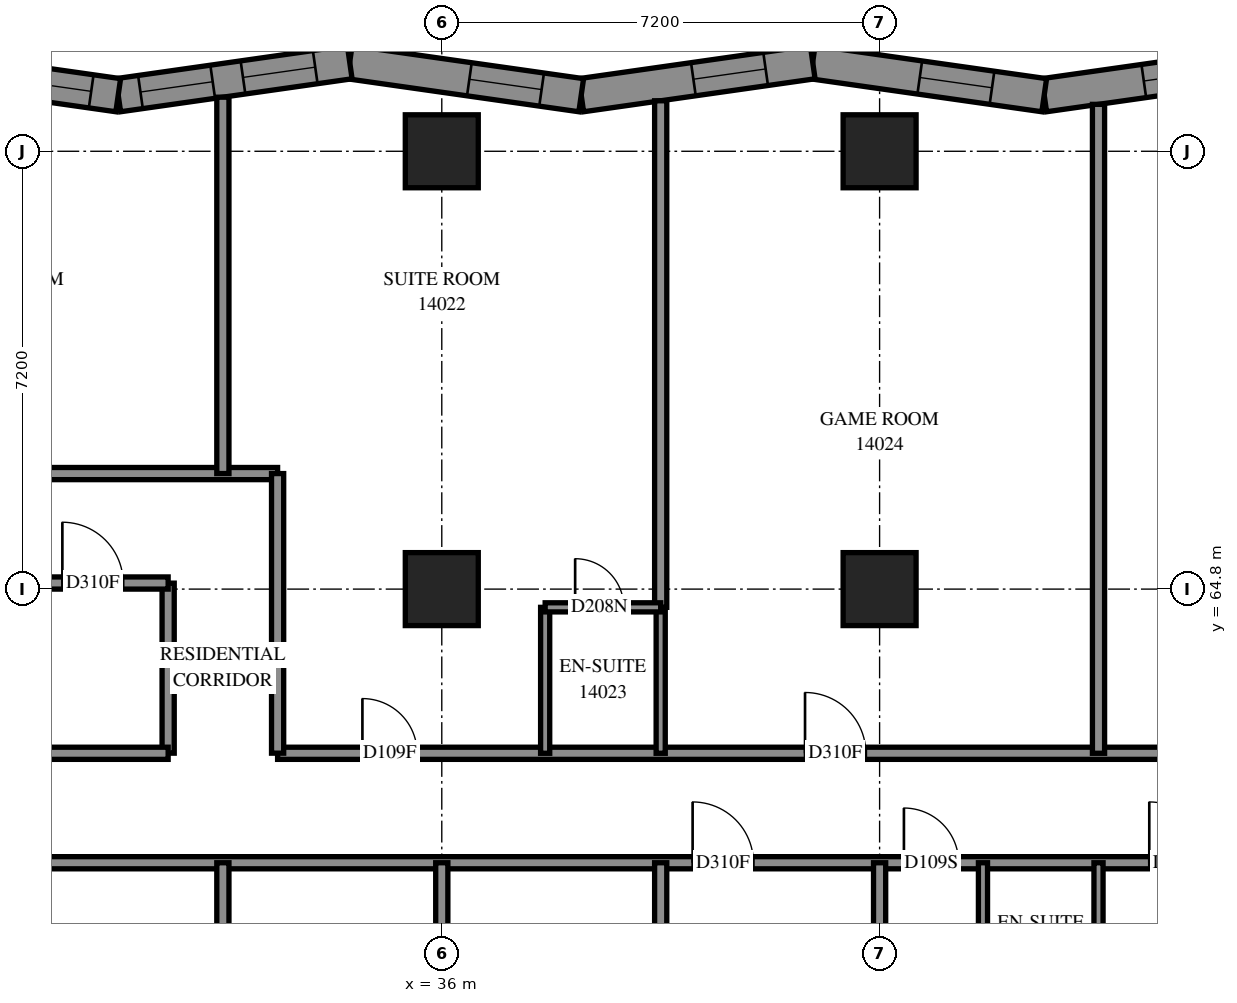
"""IFC4 building model, lengths in metres.
Left out: names, types, materials, properties, quantities, classifications, styles, units other than length and angle.
Written with IfcOpenShell. Run it as: python <this file> out.ifc"""

import sys

from ifc_helpers import new_model, si_unit, direction, frame, frame_2d, origin, origin_2d, place, context, subcontext, project, spatial, polyline, rectangle, outline, extrude, element, fill, save


model = new_model("IFC4")
c1 = context("Model", 3, precision=1e-05, world=origin(), true_north=direction((0.0, 1.0)))
c2 = subcontext(c1, "Body", "Model", "MODEL_VIEW")
j1 = project(units=[si_unit("LENGTHUNIT", "METRE"), si_unit("PLANEANGLEUNIT", "RADIAN")], contexts=[c1])
p1 = place(None, origin())
s1 = spatial("IfcSite", under=j1, at=p1, CompositionType="ELEMENT")
p2 = place(p1, origin())
s2 = spatial("IfcBuilding", under=s1, at=p2, CompositionType="ELEMENT")
p3 = place(p2, frame((0.0, 0.0, 54.2)))
s3 = spatial("IfcBuildingStorey", under=s2, at=p3, CompositionType="ELEMENT", Elevation=54.2)
for number, where, z_axis, x_axis in (
    (1, (36.0, 64.8, 0.0), (0.0, 0.0, 1.0), (1.0, 0.0, 0.0)),
    (2, (36.0, 72.0, 0.0), (0.0, 0.0, 1.0), (1.0, 0.0, 0.0)),
    (3, (43.2, 64.8, 0.0), (0.0, 0.0, 1.0), (1.0, 0.0, 0.0)),
    (4, (43.2, 72.0, 0.0), (0.0, 0.0, 1.0), (1.0, 0.0, 0.0)),
):
    element("IfcColumn", number, at=place(p3, frame(where, z_axis=z_axis, x_axis=x_axis)), inside=s3, PredefinedType="COLUMN", context=c2, shape_type="SweptSolid", body=[
        extrude(rectangle(XDim=1.2, YDim=1.2, at=origin_2d()), origin(), (0.0, 0.0, 1.0), 3.1),
    ])
p4 = place(p3, frame((49.714, 73.464, 0.0), z_axis=(0.0, 0.0, 1.0), x_axis=(-0.990016994, -0.1409480459, 0.0)))
e5 = element("IfcWall", 5, at=p4, inside=s3, PredefinedType="SOLIDWALL", context=c2, shape_type="SweptSolid", body=[
    extrude(outline(polyline([(-0.039, -0.275), (3.806, -0.275), (3.885, 0.275), (0.039, 0.275), (-0.039, -0.275)])), origin(), (0.0, 0.0, 1.0), 3.1),
])
p5 = place(p4, frame((0.991, 0.0, 0.5)))
e6 = element("IfcOpeningElement", 6, at=p5, cuts=e5, PredefinedType="OPENING", context=c2, shape_type="SweptSolid", body=[
    extrude(rectangle(XDim=1.2, YDim=2.45, at=frame_2d((0.6, 1.225))), frame((0.0, 0.285, 0.0), z_axis=(0.0, -1.0, 0.0), x_axis=(1.0, 0.0, 0.0)), (0.0, 0.0, 1.0), 0.57),
])
p6 = place(p3, frame((45.907, 72.922, 0.0), z_axis=(0.0, 0.0, 1.0), x_axis=(-0.9900175106, 0.1409444172, 0.0)))
e7 = element("IfcWall", 7, at=p6, inside=s3, PredefinedType="SOLIDWALL", context=c2, shape_type="SweptSolid", body=[
    extrude(outline(polyline([(0.039, -0.275), (3.885, -0.275), (3.806, 0.275), (-0.039, 0.275), (0.039, -0.275)])), origin(), (0.0, 0.0, 1.0), 3.1),
])
p7 = place(p6, frame((0.867, 0.0, 0.5)))
e8 = element("IfcOpeningElement", 8, at=p7, cuts=e7, PredefinedType="OPENING", context=c2, shape_type="SweptSolid", body=[
    extrude(rectangle(XDim=1.2, YDim=2.45, at=frame_2d((0.6, 1.225))), frame((0.0, 0.285, 0.0), z_axis=(0.0, -1.0, 0.0), x_axis=(1.0, 0.0, 0.0)), (0.0, 0.0, 1.0), 0.57),
])
p8 = place(p3, frame((42.1, 73.464, 0.0), z_axis=(0.0, 0.0, 1.0), x_axis=(-0.990016994, -0.1409480459, 0.0)))
e9 = element("IfcWall", 9, at=p8, inside=s3, PredefinedType="SOLIDWALL", context=c2, shape_type="SweptSolid", body=[
    extrude(outline(polyline([(-0.039, -0.275), (3.806, -0.275), (3.885, 0.275), (0.039, 0.275), (-0.039, -0.275)])), origin(), (0.0, 0.0, 1.0), 3.1),
])
p9 = place(p8, frame((0.782, 0.0, 0.5)))
e10 = element("IfcOpeningElement", 10, at=p9, cuts=e9, PredefinedType="OPENING", context=c2, shape_type="SweptSolid", body=[
    extrude(rectangle(XDim=1.2, YDim=2.45, at=frame_2d((0.6, 1.225))), frame((0.0, 0.285, 0.0), z_axis=(0.0, -1.0, 0.0), x_axis=(1.0, 0.0, 0.0)), (0.0, 0.0, 1.0), 0.57),
])
p10 = place(p3, frame((38.293, 72.922, 0.0), z_axis=(0.0, 0.0, 1.0), x_axis=(-0.990016994, 0.1409480459, 0.0)))
e11 = element("IfcWall", 11, at=p10, inside=s3, PredefinedType="SOLIDWALL", context=c2, shape_type="SweptSolid", body=[
    extrude(outline(polyline([(0.039, -0.275), (3.885, -0.275), (3.806, 0.275), (-0.039, 0.275), (0.039, -0.275)])), origin(), (0.0, 0.0, 1.0), 3.1),
])
p11 = place(p10, frame((0.658, 0.0, 0.5)))
e12 = element("IfcOpeningElement", 12, at=p11, cuts=e11, PredefinedType="OPENING", context=c2, shape_type="SweptSolid", body=[
    extrude(rectangle(XDim=1.2, YDim=2.45, at=frame_2d((0.6, 1.225))), frame((0.0, 0.285, 0.0), z_axis=(0.0, -1.0, 0.0), x_axis=(1.0, 0.0, 0.0)), (0.0, 0.0, 1.0), 0.57),
])
p12 = place(p3, frame((34.486, 73.464, 0.0), z_axis=(0.0, 0.0, 1.0), x_axis=(-0.990016994, -0.1409480459, 0.0)))
e13 = element("IfcWall", 13, at=p12, inside=s3, PredefinedType="SOLIDWALL", context=c2, shape_type="SweptSolid", body=[
    extrude(outline(polyline([(-0.039, -0.275), (3.806, -0.275), (3.885, 0.275), (0.039, 0.275), (-0.039, -0.275)])), origin(), (0.0, 0.0, 1.0), 3.1),
])
p13 = place(p12, frame((0.573, 0.0, 0.5)))
e14 = element("IfcOpeningElement", 14, at=p13, cuts=e13, PredefinedType="OPENING", context=c2, shape_type="SweptSolid", body=[
    extrude(rectangle(XDim=1.2, YDim=2.45, at=frame_2d((0.6, 1.225))), frame((0.0, 0.285, 0.0), z_axis=(0.0, -1.0, 0.0), x_axis=(1.0, 0.0, 0.0)), (0.0, 0.0, 1.0), 0.57),
])
p14 = place(p12, frame((2.276, 0.0, 0.5)))
e15 = element("IfcOpeningElement", 15, at=p14, cuts=e13, PredefinedType="OPENING", context=c2, shape_type="SweptSolid", body=[
    extrude(rectangle(XDim=1.2, YDim=2.45, at=frame_2d((0.6, 1.225))), frame((0.0, 0.285, 0.0), z_axis=(0.0, -1.0, 0.0), x_axis=(1.0, 0.0, 0.0)), (0.0, 0.0, 1.0), 0.57),
])
p15 = place(p3, frame((30.679, 72.922, 0.0), z_axis=(0.0, 0.0, 1.0), x_axis=(-0.990016994, 0.1409480459, 0.0)))
e16 = element("IfcWall", 16, at=p15, inside=s3, PredefinedType="SOLIDWALL", context=c2, shape_type="SweptSolid", body=[
    extrude(outline(polyline([(0.039, -0.275), (3.885, -0.275), (3.806, 0.275), (-0.039, 0.275), (0.039, -0.275)])), origin(), (0.0, 0.0, 1.0), 3.1),
])
p16 = place(p15, frame((0.449, 0.0, 0.5)))
e17 = element("IfcOpeningElement", 17, at=p16, cuts=e16, PredefinedType="OPENING", context=c2, shape_type="SweptSolid", body=[
    extrude(rectangle(XDim=1.2, YDim=2.45, at=frame_2d((0.6, 1.225))), frame((0.0, 0.285, 0.0), z_axis=(0.0, -1.0, 0.0), x_axis=(1.0, 0.0, 0.0)), (0.0, 0.0, 1.0), 0.57),
])
p17 = place(p15, frame((2.152, 0.0, 0.5)))
e18 = element("IfcOpeningElement", 18, at=p17, cuts=e16, PredefinedType="OPENING", context=c2, shape_type="SweptSolid", body=[
    extrude(rectangle(XDim=1.2, YDim=2.45, at=frame_2d((0.6, 1.225))), frame((0.0, 0.285, 0.0), z_axis=(0.0, -1.0, 0.0), x_axis=(1.0, 0.0, 0.0)), (0.0, 0.0, 1.0), 0.57),
])
p18 = place(p3, frame((28.802, 60.3, 0.0), z_axis=(0.0, 0.0, 1.0), x_axis=(1.0, 0.0, 0.0)))
e19 = element("IfcWall", 19, at=p18, inside=s3, PredefinedType="PARTITIONING", context=c2, shape_type="SweptSolid", body=[
    extrude(rectangle(XDim=24.108, YDim=0.2, at=frame_2d((12.054, 0.0))), origin(), (0.0, 0.0, 1.0), 3.1),
])
p19 = place(p18, frame((11.323, 0.0, 0.0)))
e20 = element("IfcOpeningElement", 20, at=p19, cuts=e19, PredefinedType="OPENING", context=c2, shape_type="SweptSolid", body=[
    extrude(rectangle(XDim=1.0, YDim=2.1, at=frame_2d((0.5, 1.05))), frame((0.0, 0.11, 0.0), z_axis=(0.0, -1.0, 0.0), x_axis=(1.0, 0.0, 0.0)), (0.0, 0.0, 1.0), 0.22),
])
p20 = place(p18, frame((14.798, 0.0, 0.0)))
e21 = element("IfcOpeningElement", 21, at=p20, cuts=e19, PredefinedType="OPENING", context=c2, shape_type="SweptSolid", body=[
    extrude(rectangle(XDim=0.9, YDim=2.1, at=frame_2d((0.45, 1.05))), frame((0.0, 0.11, 0.0), z_axis=(0.0, -1.0, 0.0), x_axis=(1.0, 0.0, 0.0)), (0.0, 0.0, 1.0), 0.22),
])
p21 = place(p18, frame((18.833, 0.0, 0.0)))
e22 = element("IfcOpeningElement", 22, at=p21, cuts=e19, PredefinedType="OPENING", context=c2, shape_type="SweptSolid", body=[
    extrude(rectangle(XDim=1.0, YDim=2.1, at=frame_2d((0.5, 1.05))), frame((0.0, 0.11, 0.0), z_axis=(0.0, -1.0, 0.0), x_axis=(1.0, 0.0, 0.0)), (0.0, 0.0, 1.0), 0.22),
])
p22 = place(p18, frame((22.839, 0.0, 0.0)))
e23 = element("IfcOpeningElement", 23, at=p22, cuts=e19, PredefinedType="OPENING", context=c2, shape_type="SweptSolid", body=[
    extrude(rectangle(XDim=1.0, YDim=2.1, at=frame_2d((0.5, 1.05))), frame((0.0, 0.11, 0.0), z_axis=(0.0, -1.0, 0.0), x_axis=(1.0, 0.0, 0.0)), (0.0, 0.0, 1.0), 0.22),
])
p23 = place(p3, frame((33.3, 62.1, 0.0), z_axis=(0.0, 0.0, 1.0), x_axis=(1.0, 0.0, 0.0)))
e24 = element("IfcWall", 24, at=p23, inside=s3, PredefinedType="PARTITIONING", context=c2, shape_type="SweptSolid", body=[
    extrude(rectangle(XDim=21.2, YDim=0.2, at=frame_2d((10.6, 0.0))), origin(), (0.0, 0.0, 1.0), 3.1),
])
p24 = place(p23, frame((1.395, 0.0, 0.0)))
e25 = element("IfcOpeningElement", 25, at=p24, cuts=e24, PredefinedType="OPENING", context=c2, shape_type="SweptSolid", body=[
    extrude(rectangle(XDim=0.9, YDim=2.1, at=frame_2d((0.45, 1.05))), frame((0.0, 0.11, 0.0), z_axis=(0.0, -1.0, 0.0), x_axis=(1.0, 0.0, 0.0)), (0.0, 0.0, 1.0), 0.22),
])
p25 = place(p23, frame((8.674, 0.0, 0.0)))
e26 = element("IfcOpeningElement", 26, at=p25, cuts=e24, PredefinedType="OPENING", context=c2, shape_type="SweptSolid", body=[
    extrude(rectangle(XDim=1.0, YDim=2.1, at=frame_2d((0.5, 1.05))), frame((0.0, 0.11, 0.0), z_axis=(0.0, -1.0, 0.0), x_axis=(1.0, 0.0, 0.0)), (0.0, 0.0, 1.0), 0.22),
])
p26 = place(p23, frame((15.874, 0.0, 0.0)))
e27 = element("IfcOpeningElement", 27, at=p26, cuts=e24, PredefinedType="OPENING", context=c2, shape_type="SweptSolid", body=[
    extrude(rectangle(XDim=1.0, YDim=2.1, at=frame_2d((0.5, 1.05))), frame((0.0, 0.11, 0.0), z_axis=(0.0, -1.0, 0.0), x_axis=(1.0, 0.0, 0.0)), (0.0, 0.0, 1.0), 0.22),
])
p27 = place(p3, frame((21.602, 66.7, 0.0), z_axis=(0.0, 0.0, 1.0), x_axis=(1.0, 0.0, 0.0)))
e28 = element("IfcWall", 28, at=p27, inside=s3, PredefinedType="PARTITIONING", context=c2, shape_type="SweptSolid", body=[
    extrude(rectangle(XDim=11.698, YDim=0.2, at=frame_2d((5.849, 0.0))), origin(), (0.0, 0.0, 1.0), 3.1),
])
p28 = place(p27, frame((1.79, 0.0, 0.0)))
e29 = element("IfcOpeningElement", 29, at=p28, cuts=e28, PredefinedType="OPENING", context=c2, shape_type="SweptSolid", body=[
    extrude(rectangle(XDim=1.0, YDim=2.1, at=frame_2d((0.5, 1.05))), frame((0.0, 0.11, 0.0), z_axis=(0.0, -1.0, 0.0), x_axis=(1.0, 0.0, 0.0)), (0.0, 0.0, 1.0), 0.22),
])
p29 = place(p27, frame((5.972, 0.0, 0.0)))
e30 = element("IfcOpeningElement", 30, at=p29, cuts=e28, PredefinedType="OPENING", context=c2, shape_type="SweptSolid", body=[
    extrude(rectangle(XDim=1.0, YDim=2.1, at=frame_2d((0.5, 1.05))), frame((0.0, 0.11, 0.0), z_axis=(0.0, -1.0, 0.0), x_axis=(1.0, 0.0, 0.0)), (0.0, 0.0, 1.0), 0.22),
])
p30 = place(p3, frame((46.8, 62.1, 0.0), z_axis=(0.0, 0.0, 1.0), x_axis=(0.0, 1.0, 0.0)))
e31 = element("IfcWall", 31, at=p30, inside=s3, PredefinedType="PARTITIONING", context=c2, shape_type="SweptSolid", body=[
    extrude(rectangle(XDim=10.672, YDim=0.2, at=frame_2d((5.336, 0.0))), origin(), (0.0, 0.0, 1.0), 3.1),
])
p31 = place(p3, frame((39.6, 64.5, 0.0), z_axis=(0.0, 0.0, 1.0), x_axis=(0.0, 1.0, 0.0)))
e32 = element("IfcWall", 32, at=p31, inside=s3, PredefinedType="PARTITIONING", context=c2, shape_type="SweptSolid", body=[
    extrude(rectangle(XDim=8.331, YDim=0.2, at=frame_2d((4.165, 0.0))), origin(), (0.0, 0.0, 1.0), 3.1),
])
p32 = place(p3, frame((32.4, 66.7, 0.0), z_axis=(0.0, 0.0, 1.0), x_axis=(0.0, 1.0, 0.0)))
e33 = element("IfcWall", 33, at=p32, inside=s3, PredefinedType="PARTITIONING", context=c2, shape_type="SweptSolid", body=[
    extrude(rectangle(XDim=6.189, YDim=0.2, at=frame_2d((3.095, 0.0))), origin(), (0.0, 0.0, 1.0), 3.1),
])
p33 = place(p3, frame((33.3, 62.102, 0.0), z_axis=(0.0, 0.0, 1.0), x_axis=(0.0, 1.0, 0.0)))
e34 = element("IfcWall", 34, at=p33, inside=s3, PredefinedType="PARTITIONING", context=c2, shape_type="SweptSolid", body=[
    extrude(rectangle(XDim=4.598, YDim=0.2, at=frame_2d((2.299, 0.0))), origin(), (0.0, 0.0, 1.0), 3.1),
])
for number, where, z_axis, x_axis in (
    (35, (32.4, 55.808, 0.0), (0.0, 0.0, 1.0), (0.0, 1.0, 0.0)),
    (36, (39.6, 55.808, 0.0), (0.0, 0.0, 1.0), (0.0, 1.0, 0.0)),
):
    element("IfcWall", number, at=place(p3, frame(where, z_axis=z_axis, x_axis=x_axis)), inside=s3, PredefinedType="PARTITIONING", context=c2, shape_type="SweptSolid", body=[
        extrude(rectangle(XDim=4.492, YDim=0.2, at=frame_2d((2.246, 0.0))), origin(), (0.0, 0.0, 1.0), 3.1),
    ])
p34 = place(p3, frame((31.5, 62.102, 0.0), z_axis=(0.0, 0.0, 1.0), x_axis=(0.0, 1.0, 0.0)))
e37 = element("IfcWall", 37, at=p34, inside=s3, PredefinedType="PARTITIONING", context=c2, shape_type="SweptSolid", body=[
    extrude(rectangle(XDim=2.796, YDim=0.2, at=frame_2d((1.398, 0.0))), origin(), (0.0, 0.0, 1.0), 3.1),
])
p35 = place(p3, frame((28.802, 62.1, 0.0), z_axis=(0.0, 0.0, 1.0), x_axis=(1.0, 0.0, 0.0)))
e38 = element("IfcWall", 38, at=p35, inside=s3, PredefinedType="PARTITIONING", context=c2, shape_type="SweptSolid", body=[
    extrude(rectangle(XDim=2.698, YDim=0.2, at=frame_2d((1.349, 0.0))), origin(), (0.0, 0.0, 1.0), 3.1),
])
for number, where, z_axis, x_axis in (
    (39, (37.7, 62.1, 0.0), (0.0, 0.0, 1.0), (0.0, 1.0, 0.0)),
    (40, (39.6, 62.1, 0.0), (0.0, 0.0, 1.0), (0.0, 1.0, 0.0)),
    (41, (44.9, 57.9, 0.0), (0.0, 0.0, 1.0), (0.0, 1.0, 0.0)),
    (42, (46.8, 57.9, 0.0), (0.0, 0.0, 1.0), (0.0, 1.0, 0.0)),
):
    element("IfcWall", number, at=place(p3, frame(where, z_axis=z_axis, x_axis=x_axis)), inside=s3, PredefinedType="PARTITIONING", context=c2, shape_type="SweptSolid", body=[
        extrude(rectangle(XDim=2.4, YDim=0.15, at=frame_2d((1.2, 0.0))), origin(), (0.0, 0.0, 1.0), 3.1),
    ])
p36 = place(p3, frame((29.4, 64.9, 0.0), z_axis=(0.0, 0.0, 1.0), x_axis=(1.0, 0.0, 0.0)))
e43 = element("IfcWall", 43, at=p36, inside=s3, PredefinedType="PARTITIONING", context=c2, shape_type="SweptSolid", body=[
    extrude(rectangle(XDim=2.1, YDim=0.2, at=frame_2d((1.05, 0.0))), origin(), (0.0, 0.0, 1.0), 3.1),
])
p37 = place(p36, frame((0.36, 0.0, 0.0)))
e44 = element("IfcOpeningElement", 44, at=p37, cuts=e43, PredefinedType="OPENING", context=c2, shape_type="SweptSolid", body=[
    extrude(rectangle(XDim=1.0, YDim=2.1, at=frame_2d((0.5, 1.05))), frame((0.0, 0.11, 0.0), z_axis=(0.0, -1.0, 0.0), x_axis=(1.0, 0.0, 0.0)), (0.0, 0.0, 1.0), 0.22),
])
for number, where, z_axis, x_axis in (
    (45, (36.0, 58.2, 0.0), (0.0, 0.0, 1.0), (0.0, 1.0, 0.0)),
    (46, (43.2, 58.2, 0.0), (0.0, 0.0, 1.0), (0.0, 1.0, 0.0)),
):
    element("IfcWall", number, at=place(p3, frame(where, z_axis=z_axis, x_axis=x_axis)), inside=s3, PredefinedType="PARTITIONING", context=c2, shape_type="SweptSolid", body=[
        extrude(rectangle(XDim=2.1, YDim=0.2, at=frame_2d((1.05, 0.0))), origin(), (0.0, 0.0, 1.0), 3.1),
    ])
p38 = place(p3, frame((37.7, 64.5, 0.0), z_axis=(0.0, 0.0, 1.0), x_axis=(1.0, 0.0, 0.0)))
e47 = element("IfcWall", 47, at=p38, inside=s3, PredefinedType="PARTITIONING", context=c2, shape_type="SweptSolid", body=[
    extrude(rectangle(XDim=1.9, YDim=0.15, at=frame_2d((0.95, 0.0))), origin(), (0.0, 0.0, 1.0), 3.1),
])
p39 = place(p38, frame((0.493, 0.0, 0.0)))
e48 = element("IfcOpeningElement", 48, at=p39, cuts=e47, PredefinedType="OPENING", context=c2, shape_type="SweptSolid", body=[
    extrude(rectangle(XDim=0.8, YDim=2.1, at=frame_2d((0.4, 1.05))), frame((0.0, 0.085, 0.0), z_axis=(0.0, -1.0, 0.0), x_axis=(1.0, 0.0, 0.0)), (0.0, 0.0, 1.0), 0.17),
])
p40 = place(p5, origin())
e49 = element("IfcWindow", 49, at=p40, inside=s3, PartitioningType="SINGLE_PANEL", PredefinedType="WINDOW", context=c2, shape_type="SweptSolid", body=[
    extrude(rectangle(XDim=1.2, YDim=2.45, at=frame_2d((0.6, 1.225))), frame((0.0, 0.155, 0.0), z_axis=(0.0, -1.0, 0.0), x_axis=(1.0, 0.0, 0.0)), (0.0, 0.0, 1.0), 0.06),
])
fill(e6, e49)
p41 = place(p7, origin())
e50 = element("IfcWindow", 50, at=p41, inside=s3, PartitioningType="SINGLE_PANEL", PredefinedType="WINDOW", context=c2, shape_type="SweptSolid", body=[
    extrude(rectangle(XDim=1.2, YDim=2.45, at=frame_2d((0.6, 1.225))), frame((0.0, 0.155, 0.0), z_axis=(0.0, -1.0, 0.0), x_axis=(1.0, 0.0, 0.0)), (0.0, 0.0, 1.0), 0.06),
])
fill(e8, e50)
p42 = place(p9, origin())
e51 = element("IfcWindow", 51, at=p42, inside=s3, PartitioningType="SINGLE_PANEL", PredefinedType="WINDOW", context=c2, shape_type="SweptSolid", body=[
    extrude(rectangle(XDim=1.2, YDim=2.45, at=frame_2d((0.6, 1.225))), frame((0.0, 0.155, 0.0), z_axis=(0.0, -1.0, 0.0), x_axis=(1.0, 0.0, 0.0)), (0.0, 0.0, 1.0), 0.06),
])
fill(e10, e51)
p43 = place(p11, origin())
e52 = element("IfcWindow", 52, at=p43, inside=s3, PartitioningType="SINGLE_PANEL", PredefinedType="WINDOW", context=c2, shape_type="SweptSolid", body=[
    extrude(rectangle(XDim=1.2, YDim=2.45, at=frame_2d((0.6, 1.225))), frame((0.0, 0.155, 0.0), z_axis=(0.0, -1.0, 0.0), x_axis=(1.0, 0.0, 0.0)), (0.0, 0.0, 1.0), 0.06),
])
fill(e12, e52)
p44 = place(p13, origin())
e53 = element("IfcWindow", 53, at=p44, inside=s3, PartitioningType="SINGLE_PANEL", PredefinedType="WINDOW", context=c2, shape_type="SweptSolid", body=[
    extrude(rectangle(XDim=1.2, YDim=2.45, at=frame_2d((0.6, 1.225))), frame((0.0, 0.155, 0.0), z_axis=(0.0, -1.0, 0.0), x_axis=(1.0, 0.0, 0.0)), (0.0, 0.0, 1.0), 0.06),
])
fill(e14, e53)
p45 = place(p14, origin())
e54 = element("IfcWindow", 54, at=p45, inside=s3, PartitioningType="SINGLE_PANEL", PredefinedType="WINDOW", context=c2, shape_type="SweptSolid", body=[
    extrude(rectangle(XDim=1.2, YDim=2.45, at=frame_2d((0.6, 1.225))), frame((0.0, 0.155, 0.0), z_axis=(0.0, -1.0, 0.0), x_axis=(1.0, 0.0, 0.0)), (0.0, 0.0, 1.0), 0.06),
])
fill(e15, e54)
p46 = place(p16, origin())
e55 = element("IfcWindow", 55, at=p46, inside=s3, PartitioningType="SINGLE_PANEL", PredefinedType="WINDOW", context=c2, shape_type="SweptSolid", body=[
    extrude(rectangle(XDim=1.2, YDim=2.45, at=frame_2d((0.6, 1.225))), frame((0.0, 0.155, 0.0), z_axis=(0.0, -1.0, 0.0), x_axis=(1.0, 0.0, 0.0)), (0.0, 0.0, 1.0), 0.06),
])
fill(e17, e55)
p47 = place(p37, origin())
e56 = element("IfcDoor", 56, at=p47, inside=s3, OperationType="SINGLE_SWING_RIGHT", PredefinedType="DOOR", context=c2, shape_type="SweptSolid", body=[
    extrude(rectangle(XDim=1.0, YDim=2.1, at=frame_2d((0.5, 1.05))), frame((0.0, 0.025, 0.0), z_axis=(0.0, -1.0, 0.0), x_axis=(1.0, 0.0, 0.0)), (0.0, 0.0, 1.0), 0.05),
])
fill(e44, e56)
p48 = place(p24, origin())
e57 = element("IfcDoor", 57, at=p48, inside=s3, OperationType="SINGLE_SWING_LEFT", PredefinedType="DOOR", context=c2, shape_type="SweptSolid", body=[
    extrude(rectangle(XDim=0.9, YDim=2.1, at=frame_2d((0.45, 1.05))), frame((0.0, 0.025, 0.0), z_axis=(0.0, -1.0, 0.0), x_axis=(1.0, 0.0, 0.0)), (0.0, 0.0, 1.0), 0.05),
])
fill(e25, e57)
p49 = place(p39, origin())
e58 = element("IfcDoor", 58, at=p49, inside=s3, OperationType="SINGLE_SWING_RIGHT", PredefinedType="DOOR", context=c2, shape_type="SweptSolid", body=[
    extrude(rectangle(XDim=0.8, YDim=2.1, at=frame_2d((0.4, 1.05))), frame((0.0, 0.025, 0.0), z_axis=(0.0, -1.0, 0.0), x_axis=(1.0, 0.0, 0.0)), (0.0, 0.0, 1.0), 0.05),
])
fill(e48, e58)
p50 = place(p25, origin())
e59 = element("IfcDoor", 59, at=p50, inside=s3, OperationType="SINGLE_SWING_LEFT", PredefinedType="DOOR", context=c2, shape_type="SweptSolid", body=[
    extrude(rectangle(XDim=1.0, YDim=2.1, at=frame_2d((0.5, 1.05))), frame((0.0, 0.025, 0.0), z_axis=(0.0, -1.0, 0.0), x_axis=(1.0, 0.0, 0.0)), (0.0, 0.0, 1.0), 0.05),
])
fill(e26, e59)
p51 = place(p19, origin())
e60 = element("IfcDoor", 60, at=p51, inside=s3, OperationType="SINGLE_SWING_RIGHT", PredefinedType="DOOR", context=c2, shape_type="SweptSolid", body=[
    extrude(rectangle(XDim=1.0, YDim=2.1, at=frame_2d((0.5, 1.05))), frame((0.0, 0.025, 0.0), z_axis=(0.0, -1.0, 0.0), x_axis=(1.0, 0.0, 0.0)), (0.0, 0.0, 1.0), 0.05),
])
fill(e20, e60)
p52 = place(p20, origin())
e61 = element("IfcDoor", 61, at=p52, inside=s3, OperationType="SINGLE_SWING_LEFT", PredefinedType="DOOR", context=c2, shape_type="SweptSolid", body=[
    extrude(rectangle(XDim=0.9, YDim=2.1, at=frame_2d((0.45, 1.05))), frame((0.0, 0.025, 0.0), z_axis=(0.0, -1.0, 0.0), x_axis=(1.0, 0.0, 0.0)), (0.0, 0.0, 1.0), 0.05),
])
fill(e21, e61)
p53 = place(p21, origin())
e62 = element("IfcDoor", 62, at=p53, inside=s3, OperationType="SINGLE_SWING_RIGHT", PredefinedType="DOOR", context=c2, shape_type="SweptSolid", body=[
    extrude(rectangle(XDim=1.0, YDim=2.1, at=frame_2d((0.5, 1.05))), frame((0.0, 0.025, 0.0), z_axis=(0.0, -1.0, 0.0), x_axis=(1.0, 0.0, 0.0)), (0.0, 0.0, 1.0), 0.05),
])
fill(e22, e62)
save(model, sys.argv[1])
